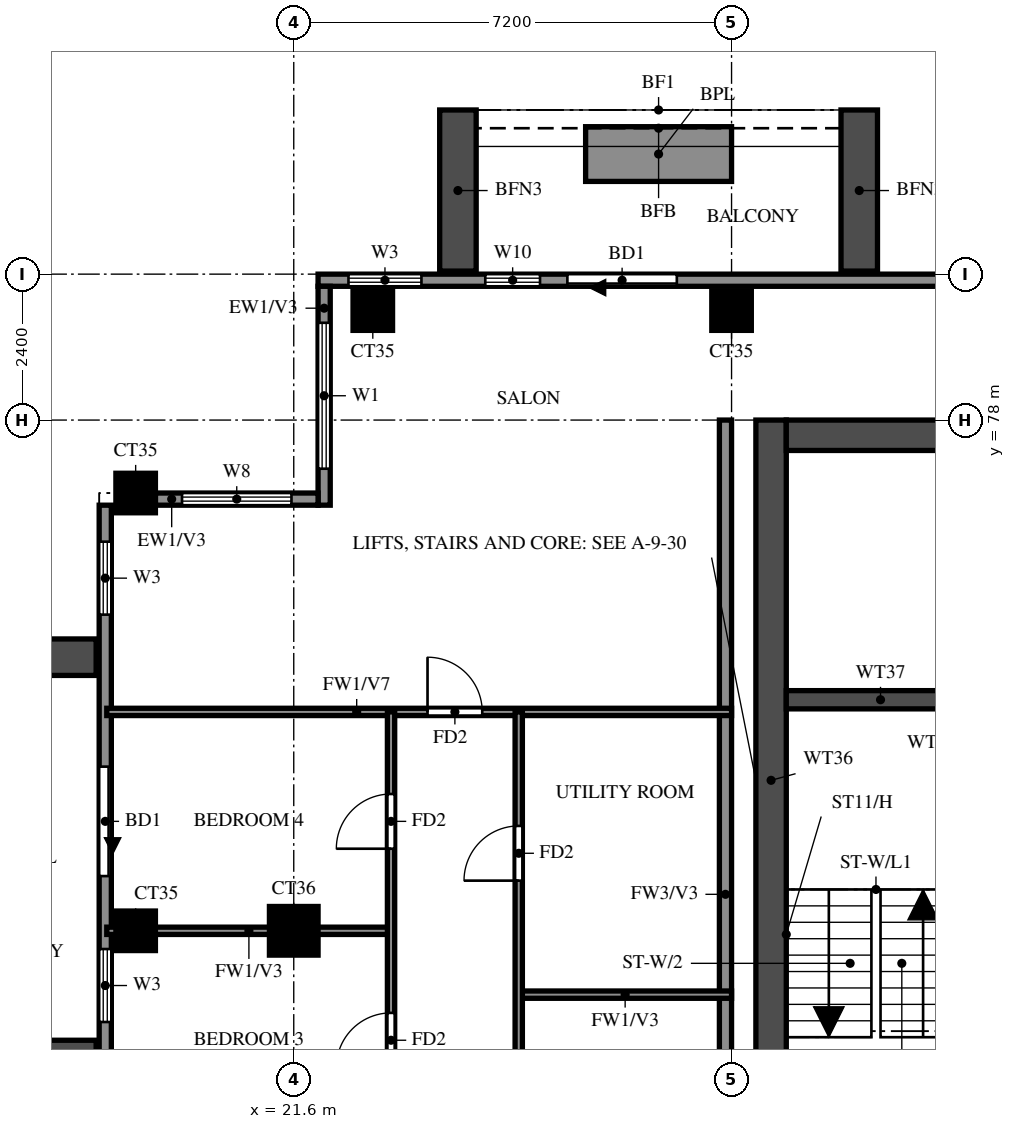
"""IFC4 building model, lengths in metres.
Left out: names, types, materials, properties, quantities, classifications, styles, units other than length and angle.
Written with IfcOpenShell. Run it as: python <this file> out.ifc"""

import sys

from ifc_helpers import new_model, si_unit, direction, frame, frame_2d, origin, origin_2d, place, context, subcontext, project, spatial, rectangle, extrude, source, transform, mapped, element, fill, save


model = new_model("IFC4")
c1 = context("Model", 3, precision=1e-05, world=origin(), true_north=direction((0.0, 1.0)))
c2 = subcontext(c1, "Body", "Model", "MODEL_VIEW")
j1 = project(units=[si_unit("LENGTHUNIT", "METRE"), si_unit("PLANEANGLEUNIT", "RADIAN")], contexts=[c1])
p1 = place(None, origin())
s1 = spatial("IfcSite", under=j1, at=p1, CompositionType="ELEMENT")
p2 = place(p1, origin())
s2 = spatial("IfcBuilding", under=s1, at=p2, CompositionType="ELEMENT")
p3 = place(p2, frame((0.0, 0.0, 239.5)))
s3 = spatial("IfcBuildingStorey", under=s2, at=p3, CompositionType="ELEMENT", Elevation=239.5)
m1 = source(origin(), c2, "Body", "SweptSolid", [
    extrude(rectangle(XDim=0.65, YDim=0.65, at=origin_2d()), origin(), (0.0, 0.0, 1.0), 3.22),
])
p4 = place(p3, frame((19.0, 69.6, 0.0), z_axis=(0.0, 0.0, 1.0), x_axis=(1.0, 0.0, 0.0)))
e1 = element("IfcColumn", 1, at=p4, inside=s3, PredefinedType="COLUMN", context=c2, shape_type="MappedRepresentation", body=[
    mapped(m1, transform((0.0, 0.0, 0.0))),
])
m2 = source(origin(), c2, "Body", "SweptSolid", [
    extrude(rectangle(XDim=0.8, YDim=0.8, at=origin_2d()), origin(), (0.0, 0.0, 1.0), 3.22),
])
p5 = place(p3, frame((21.6, 69.6, 0.0), z_axis=(0.0, 0.0, 1.0), x_axis=(1.0, 0.0, 0.0)))
e2 = element("IfcColumn", 2, at=p5, inside=s3, PredefinedType="COLUMN", context=c2, shape_type="MappedRepresentation", body=[
    mapped(m2, transform((0.0, 0.0, 0.0))),
])
for number, where, z_axis, x_axis in (
    (3, (19.0, 76.8, 0.0), (0.0, 0.0, 1.0), (1.0, 0.0, 0.0)),
    (4, (22.9, 79.8, 0.0), (0.0, 0.0, 1.0), (1.0, 0.0, 0.0)),
    (5, (28.8, 79.8, 0.0), (0.0, 0.0, 1.0), (1.0, 0.0, 0.0)),
):
    element("IfcColumn", number, at=place(p3, frame(where, z_axis=z_axis, x_axis=x_axis)), inside=s3, PredefinedType="COLUMN", context=c2, shape_type="MappedRepresentation", body=[
        mapped(m1, transform((0.0, 0.0, 0.0))),
    ])
p6 = place(p3, frame((29.45, 66.15, 0.0), z_axis=(0.0, 0.0, 1.0), x_axis=(0.0, 1.0, 0.0)))
e6 = element("IfcWall", 6, at=p6, inside=s3, PredefinedType="SHEAR", context=c2, shape_type="SweptSolid", body=[
    extrude(rectangle(XDim=11.85, YDim=0.5, at=frame_2d((5.925, 0.0))), origin(), (0.0, 0.0, 1.0), 3.22),
])
p7 = place(p3, frame((29.7, 77.75, 0.0), z_axis=(0.0, 0.0, 1.0), x_axis=(1.0, 0.0, 0.0)))
e7 = element("IfcWall", 7, at=p7, inside=s3, PredefinedType="SHEAR", context=c2, shape_type="SweptSolid", body=[
    extrude(rectangle(XDim=41.4, YDim=0.5, at=frame_2d((20.7, 0.0))), origin(), (0.0, 0.0, 1.0), 3.22),
])
p8 = place(p3, frame((29.7, 73.4, 0.0), z_axis=(0.0, 0.0, 1.0), x_axis=(1.0, 0.0, 0.0)))
e8 = element("IfcWall", 8, at=p8, inside=s3, PredefinedType="SHEAR", context=c2, shape_type="SweptSolid", body=[
    extrude(rectangle(XDim=3.1, YDim=0.3, at=frame_2d((1.55, 0.0))), origin(), (0.0, 0.0, 1.0), 3.22),
])
p9 = place(p3, frame((78.6, 80.3, 0.0), z_axis=(0.0, 0.0, 1.0), x_axis=(-1.0, 0.0, 0.0)))
e9 = element("IfcWall", 9, at=p9, inside=s3, PredefinedType="SOLIDWALL", context=c2, shape_type="SweptSolid", body=[
    extrude(rectangle(XDim=56.6, YDim=0.2, at=frame_2d((28.3, 0.0))), origin(), (0.0, 0.0, 1.0), 3.22),
])
p10 = place(p9, frame((50.7, 0.0, 0.0)))
e10 = element("IfcOpeningElement", 10, at=p10, cuts=e9, PredefinedType="OPENING", context=c2, shape_type="SweptSolid", body=[
    extrude(rectangle(XDim=1.8, YDim=2.4, at=frame_2d((0.9, 1.2))), frame((0.0, 0.11, 0.0), z_axis=(0.0, -1.0, 0.0), x_axis=(1.0, 0.0, 0.0)), (0.0, 0.0, 1.0), 0.22),
])
p11 = place(p9, frame((52.95, 0.0, 0.6)))
e11 = element("IfcOpeningElement", 11, at=p11, cuts=e9, PredefinedType="OPENING", context=c2, shape_type="SweptSolid", body=[
    extrude(rectangle(XDim=0.9, YDim=2.4, at=frame_2d((0.45, 1.2))), frame((0.0, 0.11, 0.0), z_axis=(0.0, -1.0, 0.0), x_axis=(1.0, 0.0, 0.0)), (0.0, 0.0, 1.0), 0.22),
])
p12 = place(p9, frame((54.9, 0.0, 0.6)))
e12 = element("IfcOpeningElement", 12, at=p12, cuts=e9, PredefinedType="OPENING", context=c2, shape_type="SweptSolid", body=[
    extrude(rectangle(XDim=1.2, YDim=2.4, at=frame_2d((0.6, 1.2))), frame((0.0, 0.11, 0.0), z_axis=(0.0, -1.0, 0.0), x_axis=(1.0, 0.0, 0.0)), (0.0, 0.0, 1.0), 0.22),
])
p13 = place(p9, frame((0.767, 0.0, 0.6)))
e13 = element("IfcOpeningElement", 13, at=p13, cuts=e9, PredefinedType="OPENING", context=c2, shape_type="SweptSolid", body=[
    extrude(rectangle(XDim=2.4, YDim=2.4, at=frame_2d((1.2, 1.2))), frame((0.0, 0.11, 0.0), z_axis=(0.0, -1.0, 0.0), x_axis=(1.0, 0.0, 0.0)), (0.0, 0.0, 1.0), 0.22),
])
p14 = place(p9, frame((3.633, 0.0, 0.6)))
e14 = element("IfcOpeningElement", 14, at=p14, cuts=e9, PredefinedType="OPENING", context=c2, shape_type="SweptSolid", body=[
    extrude(rectangle(XDim=2.4, YDim=2.4, at=frame_2d((1.2, 1.2))), frame((0.0, 0.11, 0.0), z_axis=(0.0, -1.0, 0.0), x_axis=(1.0, 0.0, 0.0)), (0.0, 0.0, 1.0), 0.22),
])
p15 = place(p3, frame((22.1, 80.2, 0.0), z_axis=(0.0, 0.0, 1.0), x_axis=(0.0, -1.0, 0.0)))
e15 = element("IfcWall", 15, at=p15, inside=s3, PredefinedType="SOLIDWALL", context=c2, shape_type="SweptSolid", body=[
    extrude(rectangle(XDim=3.6, YDim=0.2, at=frame_2d((1.8, 0.0))), origin(), (0.0, 0.0, 1.0), 3.22),
])
p16 = place(p15, frame((0.6, 0.0, 0.6)))
e16 = element("IfcOpeningElement", 16, at=p16, cuts=e15, PredefinedType="OPENING", context=c2, shape_type="SweptSolid", body=[
    extrude(rectangle(XDim=2.4, YDim=2.4, at=frame_2d((1.2, 1.2))), frame((0.0, 0.11, 0.0), z_axis=(0.0, -1.0, 0.0), x_axis=(1.0, 0.0, 0.0)), (0.0, 0.0, 1.0), 0.22),
])
p17 = place(p3, frame((22.0, 76.7, 0.0), z_axis=(0.0, 0.0, 1.0), x_axis=(-1.0, 0.0, 0.0)))
e17 = element("IfcWall", 17, at=p17, inside=s3, PredefinedType="SOLIDWALL", context=c2, shape_type="SweptSolid", body=[
    extrude(rectangle(XDim=2.675, YDim=0.2, at=frame_2d((1.337, 0.0))), origin(), (0.0, 0.0, 1.0), 3.22),
])
p18 = place(p17, frame((0.438, 0.0, 0.6)))
e18 = element("IfcOpeningElement", 18, at=p18, cuts=e17, PredefinedType="OPENING", context=c2, shape_type="SweptSolid", body=[
    extrude(rectangle(XDim=1.8, YDim=2.4, at=frame_2d((0.9, 1.2))), frame((0.0, 0.11, 0.0), z_axis=(0.0, -1.0, 0.0), x_axis=(1.0, 0.0, 0.0)), (0.0, 0.0, 1.0), 0.22),
])
p19 = place(p3, frame((18.5, 76.6, 0.0), z_axis=(0.0, 0.0, 1.0), x_axis=(0.0, -1.0, 0.0)))
e19 = element("IfcWall", 19, at=p19, inside=s3, PredefinedType="SOLIDWALL", context=c2, shape_type="SweptSolid", body=[
    extrude(rectangle(XDim=33.4, YDim=0.2, at=frame_2d((16.7, 0.0))), origin(), (0.0, 0.0, 1.0), 3.22),
])
p20 = place(p19, frame((4.3, 0.0, 0.0)))
e20 = element("IfcOpeningElement", 20, at=p20, cuts=e19, PredefinedType="OPENING", context=c2, shape_type="SweptSolid", body=[
    extrude(rectangle(XDim=1.8, YDim=2.4, at=frame_2d((0.9, 1.2))), frame((0.0, 0.11, 0.0), z_axis=(0.0, -1.0, 0.0), x_axis=(1.0, 0.0, 0.0)), (0.0, 0.0, 1.0), 0.22),
])
p21 = place(p19, frame((18.7, 0.0, 0.0)))
e21 = element("IfcOpeningElement", 21, at=p21, cuts=e19, PredefinedType="OPENING", context=c2, shape_type="SweptSolid", body=[
    extrude(rectangle(XDim=1.8, YDim=2.4, at=frame_2d((0.9, 1.2))), frame((0.0, 0.11, 0.0), z_axis=(0.0, -1.0, 0.0), x_axis=(1.0, 0.0, 0.0)), (0.0, 0.0, 1.0), 0.22),
])
p22 = place(p19, frame((29.7, 0.0, 0.6)))
e22 = element("IfcOpeningElement", 22, at=p22, cuts=e19, PredefinedType="OPENING", context=c2, shape_type="SweptSolid", body=[
    extrude(rectangle(XDim=2.4, YDim=2.4, at=frame_2d((1.2, 1.2))), frame((0.0, 0.11, 0.0), z_axis=(0.0, -1.0, 0.0), x_axis=(1.0, 0.0, 0.0)), (0.0, 0.0, 1.0), 0.22),
])
p23 = place(p19, frame((21.7, 0.0, 0.6)))
e23 = element("IfcOpeningElement", 23, at=p23, cuts=e19, PredefinedType="OPENING", context=c2, shape_type="SweptSolid", body=[
    extrude(rectangle(XDim=1.2, YDim=2.4, at=frame_2d((0.6, 1.2))), frame((0.0, 0.11, 0.0), z_axis=(0.0, -1.0, 0.0), x_axis=(1.0, 0.0, 0.0)), (0.0, 0.0, 1.0), 0.22),
])
p24 = place(p19, frame((25.0, 0.0, 0.6)))
e24 = element("IfcOpeningElement", 24, at=p24, cuts=e19, PredefinedType="OPENING", context=c2, shape_type="SweptSolid", body=[
    extrude(rectangle(XDim=2.4, YDim=2.4, at=frame_2d((1.2, 1.2))), frame((0.0, 0.11, 0.0), z_axis=(0.0, -1.0, 0.0), x_axis=(1.0, 0.0, 0.0)), (0.0, 0.0, 1.0), 0.22),
])
p25 = place(p19, frame((14.5, 0.0, 0.6)))
e25 = element("IfcOpeningElement", 25, at=p25, cuts=e19, PredefinedType="OPENING", context=c2, shape_type="SweptSolid", body=[
    extrude(rectangle(XDim=1.8, YDim=2.4, at=frame_2d((0.9, 1.2))), frame((0.0, 0.11, 0.0), z_axis=(0.0, -1.0, 0.0), x_axis=(1.0, 0.0, 0.0)), (0.0, 0.0, 1.0), 0.22),
])
p26 = place(p19, frame((11.2, 0.0, 0.6)))
e26 = element("IfcOpeningElement", 26, at=p26, cuts=e19, PredefinedType="OPENING", context=c2, shape_type="SweptSolid", body=[
    extrude(rectangle(XDim=2.4, YDim=2.4, at=frame_2d((1.2, 1.2))), frame((0.0, 0.11, 0.0), z_axis=(0.0, -1.0, 0.0), x_axis=(1.0, 0.0, 0.0)), (0.0, 0.0, 1.0), 0.22),
])
p27 = place(p19, frame((7.3, 0.0, 0.6)))
e27 = element("IfcOpeningElement", 27, at=p27, cuts=e19, PredefinedType="OPENING", context=c2, shape_type="SweptSolid", body=[
    extrude(rectangle(XDim=1.2, YDim=2.4, at=frame_2d((0.6, 1.2))), frame((0.0, 0.11, 0.0), z_axis=(0.0, -1.0, 0.0), x_axis=(1.0, 0.0, 0.0)), (0.0, 0.0, 1.0), 0.22),
])
p28 = place(p19, frame((9.55, 0.0, 0.6)))
e28 = element("IfcOpeningElement", 28, at=p28, cuts=e19, PredefinedType="OPENING", context=c2, shape_type="SweptSolid", body=[
    extrude(rectangle(XDim=0.9, YDim=2.4, at=frame_2d((0.45, 1.2))), frame((0.0, 0.11, 0.0), z_axis=(0.0, -1.0, 0.0), x_axis=(1.0, 0.0, 0.0)), (0.0, 0.0, 1.0), 0.22),
])
p29 = place(p19, frame((0.6, 0.0, 0.6)))
e29 = element("IfcOpeningElement", 29, at=p29, cuts=e19, PredefinedType="OPENING", context=c2, shape_type="SweptSolid", body=[
    extrude(rectangle(XDim=1.2, YDim=2.4, at=frame_2d((0.6, 1.2))), frame((0.0, 0.11, 0.0), z_axis=(0.0, -1.0, 0.0), x_axis=(1.0, 0.0, 0.0)), (0.0, 0.0, 1.0), 0.22),
])
for number, where, z_axis, x_axis in (
    (30, (30.9, 80.45, 0.0), (0.0, 0.0, 1.0), (0.0, 1.0, 0.0)),
    (31, (24.3, 80.45, 0.0), (0.0, 0.0, 1.0), (0.0, 1.0, 0.0)),
):
    element("IfcWall", number, at=place(p3, frame(where, z_axis=z_axis, x_axis=x_axis)), inside=s3, PredefinedType="SOLIDWALL", context=c2, shape_type="SweptSolid", body=[
        extrude(rectangle(XDim=2.65, YDim=0.6, at=frame_2d((1.325, 0.0))), origin(), (0.0, 0.0, 1.0), 2.85),
    ])
p30 = place(p3, frame((28.8, 82.375, 0.0), z_axis=(0.0, 0.0, 1.0), x_axis=(-1.0, 0.0, 0.0)))
e32 = element("IfcWall", 32, at=p30, inside=s3, PredefinedType="SOLIDWALL", context=c2, shape_type="SweptSolid", body=[
    extrude(rectangle(XDim=2.4, YDim=0.9, at=frame_2d((1.2, 0.0))), origin(), (0.0, 0.0, 1.0), 0.9),
])
for number, where, z_axis, x_axis in (
    (33, (18.35, 74.1, 0.0), (0.0, 0.0, 1.0), (-1.0, 0.0, 0.0)),
    (34, (18.35, 67.5, 0.0), (0.0, 0.0, 1.0), (-1.0, 0.0, 0.0)),
):
    element("IfcWall", number, at=place(p3, frame(where, z_axis=z_axis, x_axis=x_axis)), inside=s3, PredefinedType="SOLIDWALL", context=c2, shape_type="SweptSolid", body=[
        extrude(rectangle(XDim=2.65, YDim=0.6, at=frame_2d((1.325, 0.0))), origin(), (0.0, 0.0, 1.0), 2.85),
    ])
p31 = place(p3, frame((28.7, 62.4, 0.0), z_axis=(0.0, 0.0, 1.0), x_axis=(0.0, 1.0, 0.0)))
e35 = element("IfcWall", 35, at=p31, inside=s3, PredefinedType="SOLIDWALL", context=c2, shape_type="SweptSolid", body=[
    extrude(rectangle(XDim=15.6, YDim=0.2, at=frame_2d((7.8, 0.0))), origin(), (0.0, 0.0, 1.0), 3.22),
])
p32 = place(p3, frame((25.3, 68.55, 0.0), z_axis=(0.0, 0.0, 1.0), x_axis=(1.0, 0.0, 0.0)))
e36 = element("IfcWall", 36, at=p32, inside=s3, PredefinedType="PARTITIONING", context=c2, shape_type="SweptSolid", body=[
    extrude(rectangle(XDim=3.5, YDim=0.12, at=frame_2d((1.75, 0.0))), origin(), (0.0, 0.0, 1.0), 3.22),
])
p33 = place(p3, frame((18.525, 69.6, 0.0), z_axis=(0.0, 0.0, 1.0), x_axis=(1.0, 0.0, 0.0)))
e37 = element("IfcWall", 37, at=p33, inside=s3, PredefinedType="PARTITIONING", context=c2, shape_type="SweptSolid", body=[
    extrude(rectangle(XDim=4.675, YDim=0.12, at=frame_2d((2.337, 0.0))), origin(), (0.0, 0.0, 1.0), 3.22),
])
p34 = place(p3, frame((18.525, 73.2, 0.0), z_axis=(0.0, 0.0, 1.0), x_axis=(1.0, 0.0, 0.0)))
e38 = element("IfcWall", 38, at=p34, inside=s3, PredefinedType="PARTITIONING", context=c2, shape_type="SweptSolid", body=[
    extrude(rectangle(XDim=10.275, YDim=0.12, at=frame_2d((5.138, 0.0))), origin(), (0.0, 0.0, 1.0), 2.32),
])
p35 = place(p34, frame((5.275, 0.0, 0.0)))
e39 = element("IfcOpeningElement", 39, at=p35, cuts=e38, PredefinedType="OPENING", context=c2, shape_type="SweptSolid", body=[
    extrude(rectangle(XDim=0.9, YDim=2.1, at=frame_2d((0.45, 1.05))), frame((0.0, 0.07, 0.0), z_axis=(0.0, -1.0, 0.0), x_axis=(1.0, 0.0, 0.0)), (0.0, 0.0, 1.0), 0.14),
])
p36 = place(p3, frame((23.2, 48.0, 0.0), z_axis=(0.0, 0.0, 1.0), x_axis=(0.0, 1.0, 0.0)))
e40 = element("IfcWall", 40, at=p36, inside=s3, PredefinedType="PARTITIONING", context=c2, shape_type="SweptSolid", body=[
    extrude(rectangle(XDim=25.2, YDim=0.12, at=frame_2d((12.6, 0.0))), origin(), (0.0, 0.0, 1.0), 3.22),
])
p37 = place(p36, frame((2.85, 0.0, 0.0)))
e41 = element("IfcOpeningElement", 41, at=p37, cuts=e40, PredefinedType="OPENING", context=c2, shape_type="SweptSolid", body=[
    extrude(rectangle(XDim=1.5, YDim=2.1, at=frame_2d((0.75, 1.05))), frame((0.0, 0.07, 0.0), z_axis=(0.0, -1.0, 0.0), x_axis=(1.0, 0.0, 0.0)), (0.0, 0.0, 1.0), 0.14),
])
p38 = place(p36, frame((8.55, 0.0, 0.0)))
e42 = element("IfcOpeningElement", 42, at=p38, cuts=e40, PredefinedType="OPENING", context=c2, shape_type="SweptSolid", body=[
    extrude(rectangle(XDim=0.9, YDim=2.1, at=frame_2d((0.45, 1.05))), frame((0.0, 0.07, 0.0), z_axis=(0.0, -1.0, 0.0), x_axis=(1.0, 0.0, 0.0)), (0.0, 0.0, 1.0), 0.14),
])
p39 = place(p36, frame((12.15, 0.0, 0.0)))
e43 = element("IfcOpeningElement", 43, at=p39, cuts=e40, PredefinedType="OPENING", context=c2, shape_type="SweptSolid", body=[
    extrude(rectangle(XDim=0.9, YDim=2.1, at=frame_2d((0.45, 1.05))), frame((0.0, 0.07, 0.0), z_axis=(0.0, -1.0, 0.0), x_axis=(1.0, 0.0, 0.0)), (0.0, 0.0, 1.0), 0.14),
])
p40 = place(p36, frame((15.75, 0.0, 0.0)))
e44 = element("IfcOpeningElement", 44, at=p40, cuts=e40, PredefinedType="OPENING", context=c2, shape_type="SweptSolid", body=[
    extrude(rectangle(XDim=0.9, YDim=2.1, at=frame_2d((0.45, 1.05))), frame((0.0, 0.07, 0.0), z_axis=(0.0, -1.0, 0.0), x_axis=(1.0, 0.0, 0.0)), (0.0, 0.0, 1.0), 0.14),
])
p41 = place(p36, frame((19.35, 0.0, 0.0)))
e45 = element("IfcOpeningElement", 45, at=p41, cuts=e40, PredefinedType="OPENING", context=c2, shape_type="SweptSolid", body=[
    extrude(rectangle(XDim=0.9, YDim=2.1, at=frame_2d((0.45, 1.05))), frame((0.0, 0.07, 0.0), z_axis=(0.0, -1.0, 0.0), x_axis=(1.0, 0.0, 0.0)), (0.0, 0.0, 1.0), 0.14),
])
p42 = place(p36, frame((22.95, 0.0, 0.0)))
e46 = element("IfcOpeningElement", 46, at=p42, cuts=e40, PredefinedType="OPENING", context=c2, shape_type="SweptSolid", body=[
    extrude(rectangle(XDim=0.9, YDim=2.1, at=frame_2d((0.45, 1.05))), frame((0.0, 0.07, 0.0), z_axis=(0.0, -1.0, 0.0), x_axis=(1.0, 0.0, 0.0)), (0.0, 0.0, 1.0), 0.14),
])
p43 = place(p3, frame((25.3, 61.2, 0.0), z_axis=(0.0, 0.0, 1.0), x_axis=(0.0, 1.0, 0.0)))
e47 = element("IfcWall", 47, at=p43, inside=s3, PredefinedType="PARTITIONING", context=c2, shape_type="SweptSolid", body=[
    extrude(rectangle(XDim=12.0, YDim=0.12, at=frame_2d((6.0, 0.0))), origin(), (0.0, 0.0, 1.0), 3.22),
])
p44 = place(p43, frame((4.45, 0.0, 0.0)))
e48 = element("IfcOpeningElement", 48, at=p44, cuts=e47, PredefinedType="OPENING", context=c2, shape_type="SweptSolid", body=[
    extrude(rectangle(XDim=0.9, YDim=2.1, at=frame_2d((0.45, 1.05))), frame((0.0, 0.07, 0.0), z_axis=(0.0, -1.0, 0.0), x_axis=(1.0, 0.0, 0.0)), (0.0, 0.0, 1.0), 0.14),
])
p45 = place(p43, frame((9.225, 0.0, 0.0)))
e49 = element("IfcOpeningElement", 49, at=p45, cuts=e47, PredefinedType="OPENING", context=c2, shape_type="SweptSolid", body=[
    extrude(rectangle(XDim=0.9, YDim=2.1, at=frame_2d((0.45, 1.05))), frame((0.0, 0.07, 0.0), z_axis=(0.0, -1.0, 0.0), x_axis=(1.0, 0.0, 0.0)), (0.0, 0.0, 1.0), 0.14),
])
p46 = place(p10, origin())
e50 = element("IfcDoor", 50, at=p46, inside=s3, OperationType="DOUBLE_DOOR_SLIDING", PredefinedType="DOOR", context=c2, shape_type="SweptSolid", body=[
    extrude(rectangle(XDim=1.8, YDim=2.4, at=frame_2d((0.9, 1.2))), frame((0.0, 0.025, 0.0), z_axis=(0.0, -1.0, 0.0), x_axis=(1.0, 0.0, 0.0)), (0.0, 0.0, 1.0), 0.05),
])
fill(e10, e50)
p47 = place(p11, origin())
e51 = element("IfcWindow", 51, at=p47, inside=s3, PartitioningType="SINGLE_PANEL", PredefinedType="WINDOW", context=c2, shape_type="SweptSolid", body=[
    extrude(rectangle(XDim=0.9, YDim=2.4, at=frame_2d((0.45, 1.2))), frame((0.0, 0.03, 0.0), z_axis=(0.0, -1.0, 0.0), x_axis=(1.0, 0.0, 0.0)), (0.0, 0.0, 1.0), 0.06),
])
fill(e11, e51)
p48 = place(p12, origin())
e52 = element("IfcWindow", 52, at=p48, inside=s3, PartitioningType="SINGLE_PANEL", PredefinedType="WINDOW", context=c2, shape_type="SweptSolid", body=[
    extrude(rectangle(XDim=1.2, YDim=2.4, at=frame_2d((0.6, 1.2))), frame((0.0, 0.03, 0.0), z_axis=(0.0, -1.0, 0.0), x_axis=(1.0, 0.0, 0.0)), (0.0, 0.0, 1.0), 0.06),
])
fill(e12, e52)
p49 = place(p16, origin())
e53 = element("IfcWindow", 53, at=p49, inside=s3, PartitioningType="DOUBLE_PANEL_VERTICAL", PredefinedType="WINDOW", context=c2, shape_type="SweptSolid", body=[
    extrude(rectangle(XDim=2.4, YDim=2.4, at=frame_2d((1.2, 1.2))), frame((0.0, 0.03, 0.0), z_axis=(0.0, -1.0, 0.0), x_axis=(1.0, 0.0, 0.0)), (0.0, 0.0, 1.0), 0.06),
])
fill(e16, e53)
p50 = place(p18, origin())
e54 = element("IfcWindow", 54, at=p50, inside=s3, PartitioningType="DOUBLE_PANEL_VERTICAL", PredefinedType="WINDOW", context=c2, shape_type="SweptSolid", body=[
    extrude(rectangle(XDim=1.8, YDim=2.4, at=frame_2d((0.9, 1.2))), frame((0.0, 0.03, 0.0), z_axis=(0.0, -1.0, 0.0), x_axis=(1.0, 0.0, 0.0)), (0.0, 0.0, 1.0), 0.06),
])
fill(e18, e54)
p51 = place(p20, origin())
e55 = element("IfcDoor", 55, at=p51, inside=s3, OperationType="DOUBLE_DOOR_SLIDING", PredefinedType="DOOR", context=c2, shape_type="SweptSolid", body=[
    extrude(rectangle(XDim=1.8, YDim=2.4, at=frame_2d((0.9, 1.2))), frame((0.0, 0.025, 0.0), z_axis=(0.0, -1.0, 0.0), x_axis=(1.0, 0.0, 0.0)), (0.0, 0.0, 1.0), 0.05),
])
fill(e20, e55)
p52 = place(p27, origin())
e56 = element("IfcWindow", 56, at=p52, inside=s3, PartitioningType="SINGLE_PANEL", PredefinedType="WINDOW", context=c2, shape_type="SweptSolid", body=[
    extrude(rectangle(XDim=1.2, YDim=2.4, at=frame_2d((0.6, 1.2))), frame((0.0, 0.03, 0.0), z_axis=(0.0, -1.0, 0.0), x_axis=(1.0, 0.0, 0.0)), (0.0, 0.0, 1.0), 0.06),
])
fill(e27, e56)
p53 = place(p29, origin())
e57 = element("IfcWindow", 57, at=p53, inside=s3, PartitioningType="SINGLE_PANEL", PredefinedType="WINDOW", context=c2, shape_type="SweptSolid", body=[
    extrude(rectangle(XDim=1.2, YDim=2.4, at=frame_2d((0.6, 1.2))), frame((0.0, 0.03, 0.0), z_axis=(0.0, -1.0, 0.0), x_axis=(1.0, 0.0, 0.0)), (0.0, 0.0, 1.0), 0.06),
])
fill(e29, e57)
p54 = place(p41, origin())
e58 = element("IfcDoor", 58, at=p54, inside=s3, OperationType="SINGLE_SWING_RIGHT", PredefinedType="DOOR", context=c2, shape_type="SweptSolid", body=[
    extrude(rectangle(XDim=0.9, YDim=2.1, at=frame_2d((0.45, 1.05))), frame((0.0, 0.025, 0.0), z_axis=(0.0, -1.0, 0.0), x_axis=(1.0, 0.0, 0.0)), (0.0, 0.0, 1.0), 0.05),
])
fill(e45, e58)
p55 = place(p42, origin())
e59 = element("IfcDoor", 59, at=p55, inside=s3, OperationType="SINGLE_SWING_LEFT", PredefinedType="DOOR", context=c2, shape_type="SweptSolid", body=[
    extrude(rectangle(XDim=0.9, YDim=2.1, at=frame_2d((0.45, 1.05))), frame((0.0, 0.025, 0.0), z_axis=(0.0, -1.0, 0.0), x_axis=(1.0, 0.0, 0.0)), (0.0, 0.0, 1.0), 0.05),
])
fill(e46, e59)
p56 = place(p35, origin())
e60 = element("IfcDoor", 60, at=p56, inside=s3, OperationType="SINGLE_SWING_LEFT", PredefinedType="DOOR", context=c2, shape_type="SweptSolid", body=[
    extrude(rectangle(XDim=0.9, YDim=2.1, at=frame_2d((0.45, 1.05))), frame((0.0, 0.025, 0.0), z_axis=(0.0, -1.0, 0.0), x_axis=(1.0, 0.0, 0.0)), (0.0, 0.0, 1.0), 0.05),
])
fill(e39, e60)
p57 = place(p45, origin())
e61 = element("IfcDoor", 61, at=p57, inside=s3, OperationType="SINGLE_SWING_LEFT", PredefinedType="DOOR", context=c2, shape_type="SweptSolid", body=[
    extrude(rectangle(XDim=0.9, YDim=2.1, at=frame_2d((0.45, 1.05))), frame((0.0, 0.025, 0.0), z_axis=(0.0, -1.0, 0.0), x_axis=(1.0, 0.0, 0.0)), (0.0, 0.0, 1.0), 0.05),
])
fill(e49, e61)
save(model, sys.argv[1])
